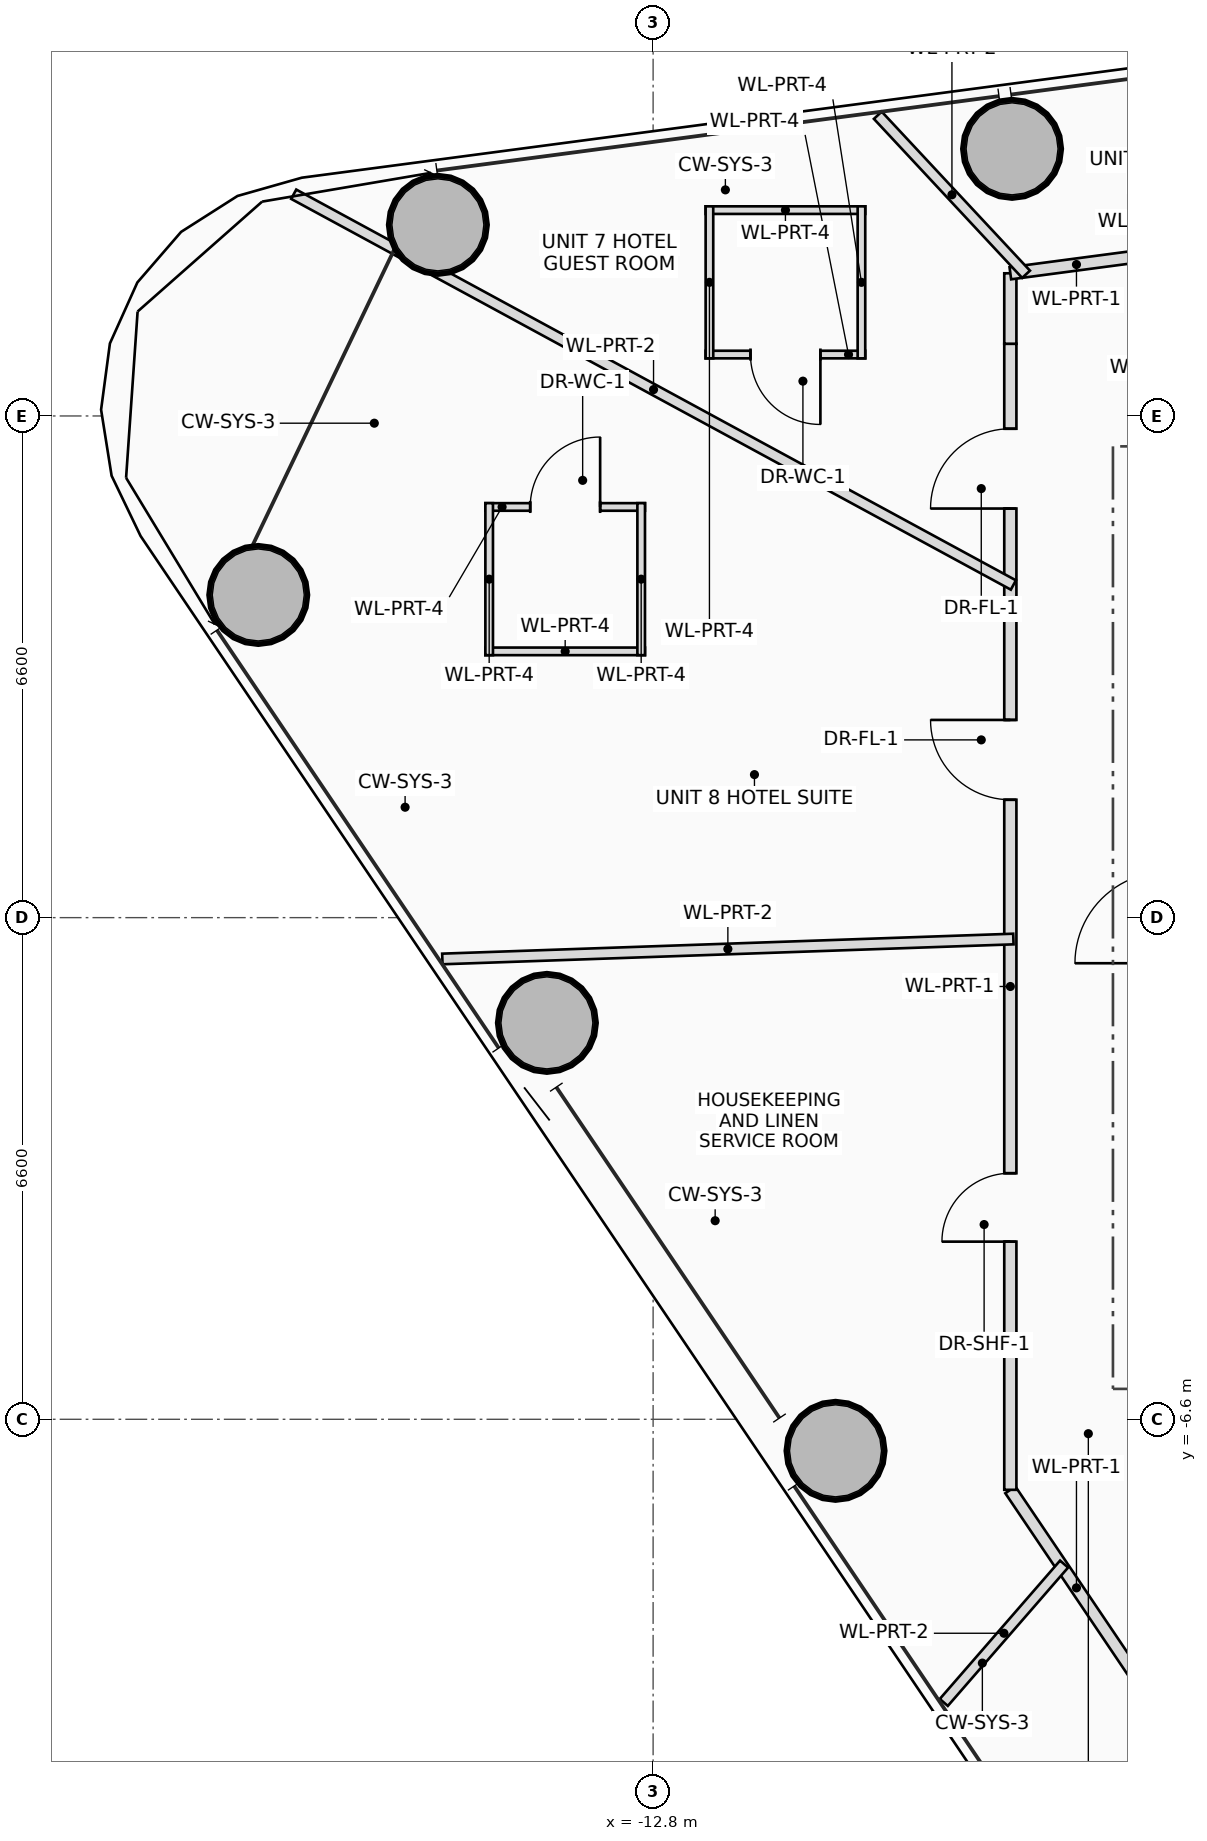
"""IFC4 building model, lengths in metres.
Left out: names, types, materials, properties, quantities, classifications, styles, units other than length and angle.
Written with IfcOpenShell. Run it as: python <this file> out.ifc"""

import sys

from ifc_helpers import new_model, si_unit, direction, frame, frame_2d, origin, origin_2d, place, context, subcontext, project, spatial, rectangle, hollow_circle, extrude, source, transform, mapped, element, fill, save


model = new_model("IFC4")
c1 = context("Model", 3, precision=1e-05, world=origin(), true_north=direction((0.0, 1.0)))
c2 = subcontext(c1, "Body", "Model", "MODEL_VIEW")
j1 = project(units=[si_unit("LENGTHUNIT", "METRE"), si_unit("PLANEANGLEUNIT", "RADIAN")], contexts=[c1])
p1 = place(None, origin())
s1 = spatial("IfcSite", under=j1, at=p1, CompositionType="ELEMENT")
p2 = place(p1, origin())
s2 = spatial("IfcBuilding", under=s1, at=p2, CompositionType="ELEMENT")
p3 = place(p2, frame((0.0, 0.0, 176.0)))
s3 = spatial("IfcBuildingStorey", under=s2, at=p3, CompositionType="ELEMENT", Elevation=176.0)
m1 = source(origin(), c2, "Body", "SweptSolid", [
    extrude(hollow_circle(Radius=0.65, WallThickness=0.045, at=origin_2d()), origin(), (0.0, 0.0, 1.0), 3.45),
])
for number, where, z_axis, x_axis in (
    (1, (-8.077, 10.114, 0.0), (0.0, 0.0, 1.0), (1.0, 0.0, 0.0)),
    (2, (-15.632, 9.114, 0.0), (0.0, 0.0, 1.0), (1.0, 0.0, 0.0)),
    (3, (-17.995, 4.245, 0.0), (0.0, 0.0, 1.0), (1.0, 0.0, 0.0)),
    (4, (-14.198, -1.385, 0.0), (0.0, 0.0, 1.0), (1.0, 0.0, 0.0)),
    (5, (-10.4, -7.015, 0.0), (0.0, 0.0, 1.0), (1.0, 0.0, 0.0)),
):
    element("IfcColumn", number, at=place(p3, frame(where, z_axis=z_axis, x_axis=x_axis)), inside=s3, PredefinedType="COLUMN", context=c2, shape_type="MappedRepresentation", body=[
        mapped(m1, transform((0.0, 0.0, 0.0), scale=1.0)),
    ])
p4 = place(p3, frame((-12.109, 9.308, 0.0), z_axis=(0.0, 0.0, 1.0), x_axis=(1.0, 0.0, 0.0)))
e6 = element("IfcWall", 6, at=p4, inside=s3, PredefinedType="PARTITIONING", context=c2, shape_type="SweptSolid", body=[
    extrude(rectangle(XDim=2.1, YDim=0.1, at=frame_2d((1.05, 0.0))), origin(), (0.0, 0.0, 1.0), 3.25),
])
p5 = place(p3, frame((-10.009, 7.408, 0.0), z_axis=(0.0, 0.0, 1.0), x_axis=(-1.0, 0.0, 0.0)))
e7 = element("IfcWall", 7, at=p5, inside=s3, PredefinedType="PARTITIONING", context=c2, shape_type="SweptSolid", body=[
    extrude(rectangle(XDim=2.1, YDim=0.1, at=frame_2d((1.05, 0.0))), origin(), (0.0, 0.0, 1.0), 2.605),
])
p6 = place(p5, frame((0.59, 0.0, 0.0)))
e8 = element("IfcOpeningElement", 8, at=p6, cuts=e7, PredefinedType="OPENING", context=c2, shape_type="SweptSolid", body=[
    extrude(rectangle(XDim=0.92, YDim=2.1, at=frame_2d((0.46, 1.05))), frame((0.0, 0.06, 0.0), z_axis=(0.0, -1.0, 0.0), x_axis=(1.0, 0.0, 0.0)), (0.0, 0.0, 1.0), 0.12),
])
p7 = place(p3, frame((-10.059, 9.358, 0.0), z_axis=(0.0, 0.0, 1.0), x_axis=(0.0, -1.0, 0.0)))
e9 = element("IfcWall", 9, at=p7, inside=s3, PredefinedType="PARTITIONING", context=c2, shape_type="SweptSolid", body=[
    extrude(rectangle(XDim=2.0, YDim=0.1, at=frame_2d((1.0, 0.0))), origin(), (0.0, 0.0, 1.0), 2.805),
])
p8 = place(p3, frame((-12.059, 7.358, 0.0), z_axis=(0.0, 0.0, 1.0), x_axis=(0.0, 1.0, 0.0)))
e10 = element("IfcWall", 10, at=p8, inside=s3, PredefinedType="PARTITIONING", context=c2, shape_type="SweptSolid", body=[
    extrude(rectangle(XDim=2.0, YDim=0.1, at=frame_2d((1.0, 0.0))), origin(), (0.0, 0.0, 1.0), 2.605),
])
p9 = place(p3, frame((-15.007, 5.403, 0.0), z_axis=(0.0, 0.0, 1.0), x_axis=(1.0, 0.0, 0.0)))
e11 = element("IfcWall", 11, at=p9, inside=s3, PredefinedType="PARTITIONING", context=c2, shape_type="SweptSolid", body=[
    extrude(rectangle(XDim=2.1, YDim=0.1, at=frame_2d((1.05, 0.0))), origin(), (0.0, 0.0, 1.0), 2.905),
])
p10 = place(p9, frame((0.59, 0.0, 0.0)))
e12 = element("IfcOpeningElement", 12, at=p10, cuts=e11, PredefinedType="OPENING", context=c2, shape_type="SweptSolid", body=[
    extrude(rectangle(XDim=0.92, YDim=2.1, at=frame_2d((0.46, 1.05))), frame((0.0, 0.06, 0.0), z_axis=(0.0, -1.0, 0.0), x_axis=(1.0, 0.0, 0.0)), (0.0, 0.0, 1.0), 0.12),
])
p11 = place(p3, frame((-12.907, 3.503, 0.0), z_axis=(0.0, 0.0, 1.0), x_axis=(-1.0, 0.0, 0.0)))
e13 = element("IfcWall", 13, at=p11, inside=s3, PredefinedType="PARTITIONING", context=c2, shape_type="SweptSolid", body=[
    extrude(rectangle(XDim=2.1, YDim=0.1, at=frame_2d((1.05, 0.0))), origin(), (0.0, 0.0, 1.0), 2.905),
])
for number, where, z_axis, x_axis in (
    (14, (-12.957, 5.453, 0.0), (0.0, 0.0, 1.0), (0.0, -1.0, 0.0)),
    (15, (-14.957, 3.453, 0.0), (0.0, 0.0, 1.0), (0.0, 1.0, 0.0)),
):
    element("IfcWall", number, at=place(p3, frame(where, z_axis=z_axis, x_axis=x_axis)), inside=s3, PredefinedType="PARTITIONING", context=c2, shape_type="SweptSolid", body=[
        extrude(rectangle(XDim=2.0, YDim=0.1, at=frame_2d((1.0, 0.0))), origin(), (0.0, 0.0, 1.0), 2.605),
    ])
p12 = place(p3, frame((-6.36, -10.107, 0.0), z_axis=(0.0, 0.0, 1.0), x_axis=(-0.559200615657, 0.829032370567, 0.0)))
e16 = element("IfcWall", 16, at=p12, inside=s3, PredefinedType="PARTITIONING", context=c2, shape_type="SweptSolid", body=[
    extrude(rectangle(XDim=3.112, YDim=0.16, at=frame_2d((1.556, 0.0))), origin(), (0.0, 0.0, 1.0), 2.605),
])
p13 = place(p3, frame((-8.1, -7.528, 0.0), z_axis=(0.0, 0.0, 1.0), x_axis=(0.0, 1.0, 0.0)))
e17 = element("IfcWall", 17, at=p13, inside=s3, PredefinedType="PARTITIONING", context=c2, shape_type="SweptSolid", body=[
    extrude(rectangle(XDim=15.078, YDim=0.16, at=frame_2d((7.539, 0.0))), origin(), (0.0, 0.0, 1.0), 2.605),
])
p14 = place(p13, frame((3.265, 0.0, 0.0)))
e18 = element("IfcOpeningElement", 18, at=p14, cuts=e17, PredefinedType="OPENING", context=c2, shape_type="SweptSolid", body=[
    extrude(rectangle(XDim=0.9, YDim=2.05, at=frame_2d((0.45, 1.025))), frame((0.0, 0.09, 0.0), z_axis=(0.0, -1.0, 0.0), x_axis=(1.0, 0.0, 0.0)), (0.0, 0.0, 1.0), 0.18),
])
p15 = place(p13, frame((9.079, 0.0, 0.0)))
e19 = element("IfcOpeningElement", 19, at=p15, cuts=e17, PredefinedType="OPENING", context=c2, shape_type="SweptSolid", body=[
    extrude(rectangle(XDim=1.05, YDim=2.2, at=frame_2d((0.525, 1.1))), frame((0.0, 0.09, 0.0), z_axis=(0.0, -1.0, 0.0), x_axis=(1.0, 0.0, 0.0)), (0.0, 0.0, 1.0), 0.18),
])
p16 = place(p13, frame((12.91, 0.0, 0.0)))
e20 = element("IfcOpeningElement", 20, at=p16, cuts=e17, PredefinedType="OPENING", context=c2, shape_type="SweptSolid", body=[
    extrude(rectangle(XDim=1.05, YDim=2.2, at=frame_2d((0.525, 1.1))), frame((0.0, 0.09, 0.0), z_axis=(0.0, -1.0, 0.0), x_axis=(1.0, 0.0, 0.0)), (0.0, 0.0, 1.0), 0.18),
])
p17 = place(p3, frame((-8.1, 7.55, 0.0), z_axis=(0.0, 0.0, 1.0), x_axis=(0.0, 1.0, 0.0)))
e21 = element("IfcWall", 21, at=p17, inside=s3, PredefinedType="PARTITIONING", context=c2, shape_type="SweptSolid", body=[
    extrude(rectangle(XDim=0.927, YDim=0.16, at=frame_2d((0.463, 0.0))), origin(), (0.0, 0.0, 1.0), 2.805),
])
p18 = place(p3, frame((-8.1, 8.477, 0.0), z_axis=(0.0, 0.0, 1.0), x_axis=(0.991341723558, 0.131307224223, 0.0)))
e22 = element("IfcWall", 22, at=p18, inside=s3, PredefinedType="PARTITIONING", context=c2, shape_type="SweptSolid", body=[
    extrude(rectangle(XDim=1.755, YDim=0.16, at=frame_2d((0.877, 0.0))), origin(), (0.0, 0.0, 1.0), 2.605),
])
p19 = place(p3, frame((-7.893, 8.464, 0.0), z_axis=(0.0, 0.0, 1.0), x_axis=(-0.682011061147, 0.73134185746, 0.0)))
e23 = element("IfcWall", 23, at=p19, inside=s3, PredefinedType="PARTITIONING", context=c2, shape_type="SweptSolid", body=[
    extrude(rectangle(XDim=2.861, YDim=0.14, at=frame_2d((1.43, 0.0))), origin(), (0.0, 0.0, 1.0), 2.765),
])
p20 = place(p3, frame((-8.06, 4.376, 0.0), z_axis=(0.0, 0.0, 1.0), x_axis=(-0.878817054271, 0.477158867802, 0.0)))
e24 = element("IfcWall", 24, at=p20, inside=s3, PredefinedType="PARTITIONING", context=c2, shape_type="SweptSolid", body=[
    extrude(rectangle(XDim=10.774, YDim=0.14, at=frame_2d((5.387, 0.0))), origin(), (0.0, 0.0, 1.0), 2.605),
])
p21 = place(p3, frame((-8.06, -0.281, 0.0), z_axis=(0.0, 0.0, 1.0), x_axis=(-0.999391525522, -0.034879488461, 0.0)))
e25 = element("IfcWall", 25, at=p21, inside=s3, PredefinedType="PARTITIONING", context=c2, shape_type="SweptSolid", body=[
    extrude(rectangle(XDim=7.518, YDim=0.14, at=frame_2d((3.759, 0.0))), origin(), (0.0, 0.0, 1.0), 2.765),
])
p22 = place(p3, frame((-7.393, -8.505, 0.0), z_axis=(0.0, 0.0, 1.0), x_axis=(-0.656043394523, -0.754723170774, 0.0)))
e26 = element("IfcWall", 26, at=p22, inside=s3, PredefinedType="PARTITIONING", context=c2, shape_type="SweptSolid", body=[
    extrude(rectangle(XDim=2.412, YDim=0.14, at=frame_2d((1.206, 0.0))), origin(), (0.0, 0.0, 1.0), 2.765),
])
p23 = place(p6, origin())
e27 = element("IfcDoor", 27, at=p23, inside=s3, OperationType="SINGLE_SWING_LEFT", PredefinedType="DOOR", context=c2, shape_type="SweptSolid", body=[
    extrude(rectangle(XDim=0.92, YDim=2.1, at=frame_2d((0.46, 1.05))), frame((0.0, 0.025, 0.0), z_axis=(0.0, -1.0, 0.0), x_axis=(1.0, 0.0, 0.0)), (0.0, 0.0, 1.0), 0.05),
])
fill(e8, e27)
p24 = place(p10, origin())
e28 = element("IfcDoor", 28, at=p24, inside=s3, OperationType="SINGLE_SWING_RIGHT", PredefinedType="DOOR", context=c2, shape_type="SweptSolid", body=[
    extrude(rectangle(XDim=0.92, YDim=2.1, at=frame_2d((0.46, 1.05))), frame((0.0, 0.025, 0.0), z_axis=(0.0, -1.0, 0.0), x_axis=(1.0, 0.0, 0.0)), (0.0, 0.0, 1.0), 0.05),
])
fill(e12, e28)
p25 = place(p14, origin())
e29 = element("IfcDoor", 29, at=p25, inside=s3, OperationType="SINGLE_SWING_LEFT", PredefinedType="DOOR", context=c2, shape_type="SweptSolid", body=[
    extrude(rectangle(XDim=0.9, YDim=2.05, at=frame_2d((0.45, 1.025))), frame((0.0, 0.025, 0.0), z_axis=(0.0, -1.0, 0.0), x_axis=(1.0, 0.0, 0.0)), (0.0, 0.0, 1.0), 0.05),
])
fill(e18, e29)
p26 = place(p15, origin())
e30 = element("IfcDoor", 30, at=p26, inside=s3, OperationType="SINGLE_SWING_RIGHT", PredefinedType="DOOR", context=c2, shape_type="SweptSolid", body=[
    extrude(rectangle(XDim=1.05, YDim=2.2, at=frame_2d((0.525, 1.1))), frame((0.0, 0.025, 0.0), z_axis=(0.0, -1.0, 0.0), x_axis=(1.0, 0.0, 0.0)), (0.0, 0.0, 1.0), 0.05),
])
fill(e19, e30)
p27 = place(p16, origin())
e31 = element("IfcDoor", 31, at=p27, inside=s3, OperationType="SINGLE_SWING_LEFT", PredefinedType="DOOR", context=c2, shape_type="SweptSolid", body=[
    extrude(rectangle(XDim=1.05, YDim=2.2, at=frame_2d((0.525, 1.1))), frame((0.0, 0.025, 0.0), z_axis=(0.0, -1.0, 0.0), x_axis=(1.0, 0.0, 0.0)), (0.0, 0.0, 1.0), 0.05),
])
fill(e20, e31)
save(model, sys.argv[1])
